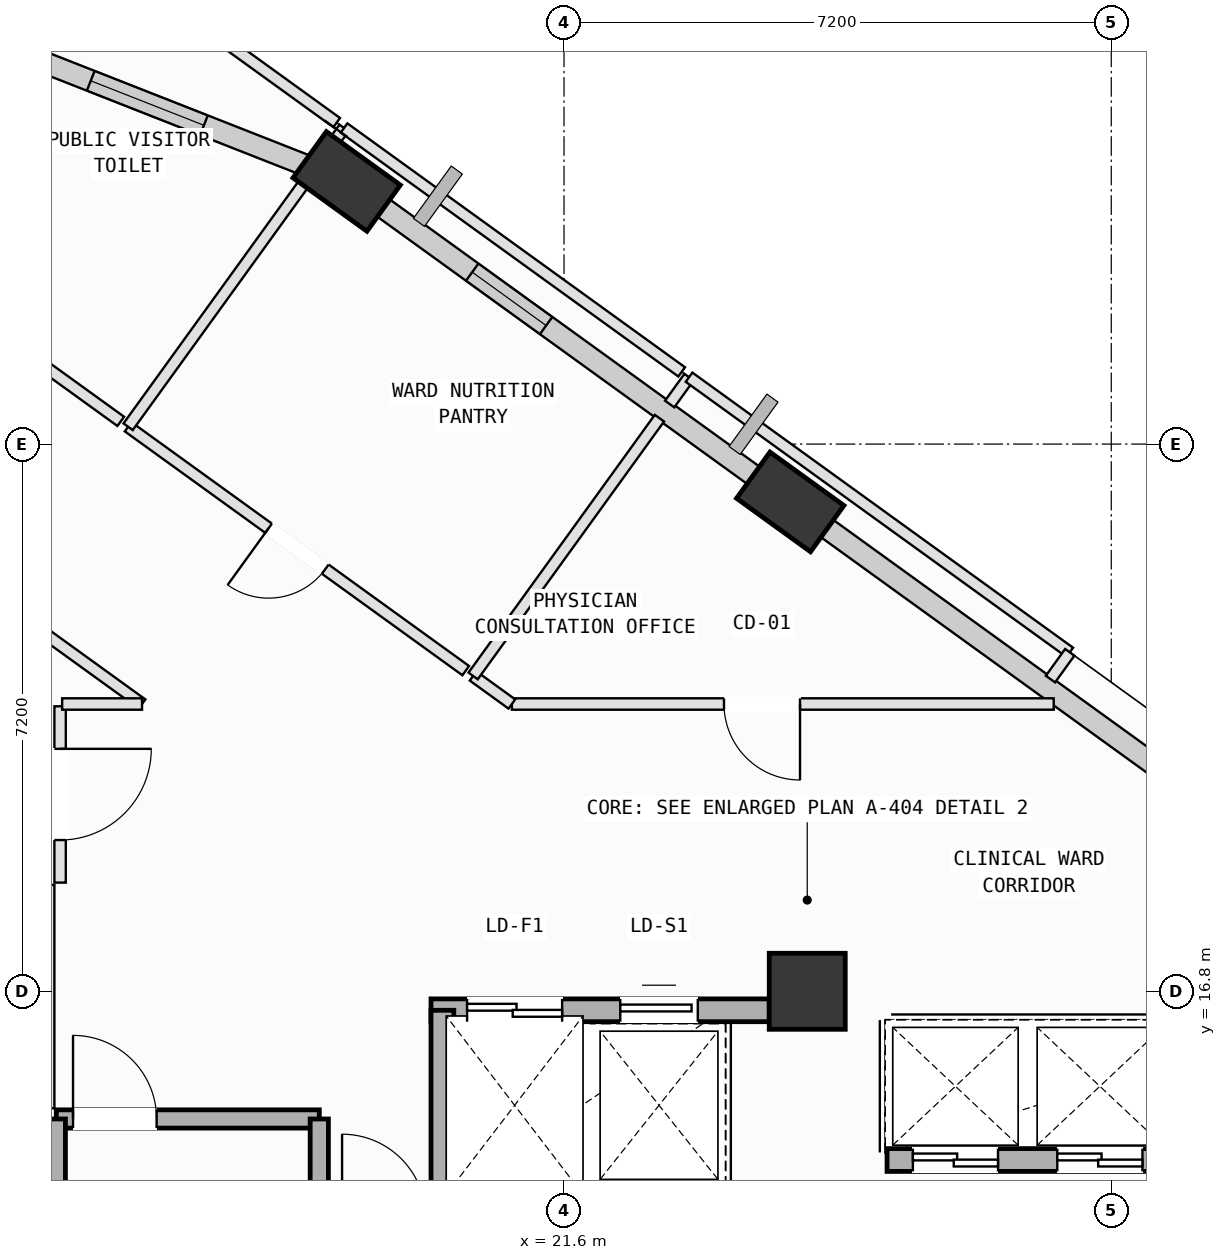
"""IFC4 building model, lengths in metres.
Left out: names, types, materials, properties, quantities, classifications, styles, units other than length and angle.
Written with IfcOpenShell. Run it as: python <this file> out.ifc"""

import sys

from ifc_helpers import new_model, si_unit, direction, frame, frame_2d, origin, origin_2d, place, context, subcontext, project, spatial, rectangle, extrude, element, fill, save


model = new_model("IFC4")
c1 = context("Model", 3, precision=1e-05, world=origin(), true_north=direction((0.0, 1.0)))
c2 = subcontext(c1, "Body", "Model", "MODEL_VIEW")
j1 = project(units=[si_unit("LENGTHUNIT", "METRE"), si_unit("PLANEANGLEUNIT", "RADIAN")], contexts=[c1])
p1 = place(None, origin())
s1 = spatial("IfcSite", under=j1, at=p1, CompositionType="ELEMENT")
p2 = place(p1, origin())
s2 = spatial("IfcBuilding", under=s1, at=p2, CompositionType="ELEMENT")
p3 = place(p2, frame((0.0, 0.0, 255.2)))
s3 = spatial("IfcBuildingStorey", under=s2, at=p3, CompositionType="ELEMENT", Elevation=255.2)
p4 = place(p3, frame((24.8, 16.8, 0.0), z_axis=(0.0, 0.0, 1.0), x_axis=(1.0, 0.0, 0.0)))
e1 = element("IfcColumn", 1, at=p4, inside=s3, PredefinedType="COLUMN", context=c2, shape_type="SweptSolid", body=[
    extrude(rectangle(XDim=1.0, YDim=1.0, at=origin_2d()), origin(), (0.0, 0.0, 1.0), 4.0),
])
p5 = place(p3, frame((24.576, 23.239, 0.002), z_axis=(0.006776235998, -0.037299821574, 0.999281144592), x_axis=(-0.902108356934, 0.430937987842, 0.022202769759)))
e2 = element("IfcColumn", 2, at=p5, inside=s3, PredefinedType="COLUMN", context=c2, shape_type="SweptSolid", body=[
    extrude(rectangle(XDim=1.2, YDim=0.75, at=origin_2d()), origin(), (0.0, 0.0, 1.0), 3.999),
])
p6 = place(p3, frame((18.74, 27.456, 0.002), z_axis=(-0.010426179939, -0.061581530636, 0.998047598993), x_axis=(-0.7016048019, 0.711626761454, 0.036579425007)))
e3 = element("IfcColumn", 3, at=p6, inside=s3, PredefinedType="COLUMN", context=c2, shape_type="SweptSolid", body=[
    extrude(rectangle(XDim=1.2, YDim=0.75, at=origin_2d()), origin(), (0.0, 0.0, 1.0), 4.004),
])
p7 = place(p3, frame((24.94, 22.976, 0.0), z_axis=(0.0, 0.0, 1.0), x_axis=(0.81054690161, -0.585673731945, 0.0)))
e4 = element("IfcWall", 4, at=p7, inside=s3, PredefinedType="SOLIDWALL", context=c2, shape_type="SweptSolid", body=[
    extrude(rectangle(XDim=6.958, YDim=0.28, at=frame_2d((3.479, 0.0))), origin(), (0.0, 0.0, 1.0), 3.165),
])
p8 = place(p3, frame((19.094, 27.2, 0.0), z_axis=(0.0, 0.0, 1.0), x_axis=(0.810562962933, -0.585651503132, 0.0)))
e5 = element("IfcWall", 5, at=p8, inside=s3, PredefinedType="SOLIDWALL", context=c2, shape_type="SweptSolid", body=[
    extrude(rectangle(XDim=6.424, YDim=0.28, at=frame_2d((3.212, 0.0))), origin(), (0.0, 0.0, 1.0), 3.265),
])
p9 = place(p8, frame((1.601, 0.0, 0.75)))
e6 = element("IfcOpeningElement", 6, at=p9, cuts=e5, PredefinedType="OPENING", context=c2, shape_type="SweptSolid", body=[
    extrude(rectangle(XDim=1.2, YDim=1.75, at=frame_2d((0.6, 0.875))), frame((0.0, 0.15, 0.0), z_axis=(0.0, -1.0, 0.0), x_axis=(1.0, 0.0, 0.0)), (0.0, 0.0, 1.0), 0.3),
])
p10 = place(p3, frame((13.478, 29.526, 0.0), z_axis=(0.0, 0.0, 1.0), x_axis=(0.930610950032, -0.366009917461, 0.0)))
e7 = element("IfcWall", 7, at=p10, inside=s3, PredefinedType="SOLIDWALL", context=c2, shape_type="SweptSolid", body=[
    extrude(rectangle(XDim=5.302, YDim=0.28, at=frame_2d((2.651, 0.0))), origin(), (0.0, 0.0, 1.0), 3.265),
])
p11 = place(p10, frame((2.037, 0.0, 0.75)))
e8 = element("IfcOpeningElement", 8, at=p11, cuts=e7, PredefinedType="OPENING", context=c2, shape_type="SweptSolid", body=[
    extrude(rectangle(XDim=1.6, YDim=1.95, at=frame_2d((0.8, 0.975))), frame((0.0, 0.15, 0.0), z_axis=(0.0, -1.0, 0.0), x_axis=(1.0, 0.0, 0.0)), (0.0, 0.0, 1.0), 0.3),
])
p12 = place(p3, frame((14.92, 15.12, 0.0), z_axis=(0.0, 0.0, 1.0), x_axis=(1.0, 0.0, 0.0)))
e9 = element("IfcWall", 9, at=p12, inside=s3, PredefinedType="SOLIDWALL", context=c2, shape_type="SweptSolid", body=[
    extrude(rectangle(XDim=3.46, YDim=0.24, at=frame_2d((1.73, 0.0))), origin(), (0.0, 0.0, 1.0), 3.78),
])
p13 = place(p12, frame((0.22, 0.0, 0.0)))
e10 = element("IfcOpeningElement", 10, at=p13, cuts=e9, PredefinedType="OPENING", context=c2, shape_type="SweptSolid", body=[
    extrude(rectangle(XDim=1.1, YDim=2.15, at=frame_2d((0.55, 1.075))), frame((0.0, 0.13, 0.0), z_axis=(0.0, -1.0, 0.0), x_axis=(1.0, 0.0, 0.0)), (0.0, 0.0, 1.0), 0.26),
])
for number, where, z_axis, x_axis in (
    (11, (18.38, 15.12, 0.0), (0.0, 0.0, 1.0), (0.0, -1.0, 0.0)),
    (12, (14.92, 8.075, 0.0), (0.0, 0.0, 1.0), (0.0, 1.0, 0.0)),
):
    element("IfcWall", number, at=place(p3, frame(where, z_axis=z_axis, x_axis=x_axis)), inside=s3, PredefinedType="SOLIDWALL", context=c2, shape_type="SweptSolid", body=[
        extrude(rectangle(XDim=7.045, YDim=0.24, at=frame_2d((3.522, 0.0))), origin(), (0.0, 0.0, 1.0), 3.78),
    ])
p14 = place(p3, frame((19.85, 16.55, 0.0), z_axis=(0.0, 0.0, 1.0), x_axis=(1.0, 0.0, 0.0)))
e13 = element("IfcWall", 13, at=p14, inside=s3, PredefinedType="SOLIDWALL", context=c2, shape_type="SweptSolid", body=[
    extrude(rectangle(XDim=4.45, YDim=0.3, at=frame_2d((2.225, 0.0))), origin(), (0.0, 0.0, 1.0), 3.78),
])
p15 = place(p14, frame((0.475, 0.0, 0.0)))
e14 = element("IfcOpeningElement", 14, at=p15, cuts=e13, PredefinedType="OPENING", context=c2, shape_type="SweptSolid", body=[
    extrude(rectangle(XDim=1.25, YDim=2.18, at=frame_2d((0.625, 1.09))), frame((0.0, 0.16, 0.0), z_axis=(0.0, -1.0, 0.0), x_axis=(1.0, 0.0, 0.0)), (0.0, 0.0, 1.0), 0.32),
])
p16 = place(p14, frame((2.49, 0.0, 0.0)))
e15 = element("IfcOpeningElement", 15, at=p16, cuts=e13, PredefinedType="OPENING", context=c2, shape_type="SweptSolid", body=[
    extrude(rectangle(XDim=1.02, YDim=2.12, at=frame_2d((0.51, 1.06))), frame((0.0, 0.16, 0.0), z_axis=(0.0, -1.0, 0.0), x_axis=(1.0, 0.0, 0.0)), (0.0, 0.0, 1.0), 0.32),
])
p17 = place(p3, frame((20.0, 13.82, 0.0), z_axis=(0.0, 0.0, 1.0), x_axis=(0.0, 1.0, 0.0)))
e16 = element("IfcWall", 16, at=p17, inside=s3, PredefinedType="SOLIDWALL", context=c2, shape_type="SweptSolid", body=[
    extrude(rectangle(XDim=2.73, YDim=0.3, at=frame_2d((1.365, 0.0))), origin(), (0.0, 0.0, 1.0), 3.78),
])
p18 = place(p3, frame((25.85, 14.58, 0.0), z_axis=(0.0, 0.0, 1.0), x_axis=(1.0, 0.0, 0.0)))
e17 = element("IfcWall", 17, at=p18, inside=s3, PredefinedType="SOLIDWALL", context=c2, shape_type="SweptSolid", body=[
    extrude(rectangle(XDim=5.45, YDim=0.3, at=frame_2d((2.725, 0.0))), origin(), (0.0, 0.0, 1.0), 3.78),
])
p19 = place(p18, frame((0.34, 0.0, 0.0)))
e18 = element("IfcOpeningElement", 18, at=p19, cuts=e17, PredefinedType="OPENING", context=c2, shape_type="SweptSolid", body=[
    extrude(rectangle(XDim=1.12, YDim=2.15, at=frame_2d((0.56, 1.075))), frame((0.0, 0.16, 0.0), z_axis=(0.0, -1.0, 0.0), x_axis=(1.0, 0.0, 0.0)), (0.0, 0.0, 1.0), 0.32),
])
p20 = place(p18, frame((2.24, 0.0, 0.0)))
e19 = element("IfcOpeningElement", 19, at=p20, cuts=e17, PredefinedType="OPENING", context=c2, shape_type="SweptSolid", body=[
    extrude(rectangle(XDim=1.12, YDim=2.15, at=frame_2d((0.56, 1.075))), frame((0.0, 0.16, 0.0), z_axis=(0.0, -1.0, 0.0), x_axis=(1.0, 0.0, 0.0)), (0.0, 0.0, 1.0), 0.32),
])
p21 = place(p3, frame((14.97, 20.55, 0.0), z_axis=(0.0, 0.0, 1.0), x_axis=(0.0, -1.0, 0.0)))
e20 = element("IfcWall", 20, at=p21, inside=s3, PredefinedType="PARTITIONING", context=c2, shape_type="SweptSolid", body=[
    extrude(rectangle(XDim=2.32, YDim=0.15, at=frame_2d((1.16, 0.0))), origin(), (0.0, 0.0, 1.0), 3.78),
])
p22 = place(p21, frame((0.56, 0.0, 0.0)))
e21 = element("IfcOpeningElement", 21, at=p22, cuts=e20, PredefinedType="OPENING", context=c2, shape_type="SweptSolid", body=[
    extrude(rectangle(XDim=1.2, YDim=2.15, at=frame_2d((0.6, 1.075))), frame((0.0, 0.085, 0.0), z_axis=(0.0, -1.0, 0.0), x_axis=(1.0, 0.0, 0.0)), (0.0, 0.0, 1.0), 0.17),
])
p23 = place(p3, frame((14.82, 18.2, 0.0), z_axis=(0.0, 0.0, 1.0), x_axis=(0.0, -1.0, 0.0)))
e22 = element("IfcWall", 22, at=p23, inside=s3, PredefinedType="PARTITIONING", context=c2, shape_type="SweptSolid", body=[
    extrude(rectangle(XDim=2.94, YDim=0.15, at=frame_2d((1.47, 0.0))), origin(), (0.0, 0.0, 1.0), 3.78),
])
p24 = place(p3, frame((14.31, 21.836, 0.0), z_axis=(0.0, 0.0, 1.0), x_axis=(0.810544103315, -0.585677604643, 0.0)))
e23 = element("IfcWall", 23, at=p24, inside=s3, PredefinedType="PARTITIONING", context=c2, shape_type="SweptSolid", body=[
    extrude(rectangle(XDim=2.144, YDim=0.15, at=frame_2d((1.072, 0.0))), origin(), (0.0, 0.0, 1.0), 3.78),
])
p25 = place(p3, frame((16.048, 20.58, 0.0), z_axis=(0.0, 0.0, 1.0), x_axis=(-1.0, 0.0, 0.0)))
e24 = element("IfcWall", 24, at=p25, inside=s3, PredefinedType="PARTITIONING", context=c2, shape_type="SweptSolid", body=[
    extrude(rectangle(XDim=1.051, YDim=0.15, at=frame_2d((0.525, 0.0))), origin(), (0.0, 0.0, 1.0), 3.78),
])
p26 = place(p3, frame((28.043, 20.58, 0.0), z_axis=(0.0, 0.0, 1.0), x_axis=(-1.0, 0.0, 0.0)))
e25 = element("IfcWall", 25, at=p26, inside=s3, PredefinedType="PARTITIONING", context=c2, shape_type="SweptSolid", body=[
    extrude(rectangle(XDim=7.129, YDim=0.15, at=frame_2d((3.564, 0.0))), origin(), (0.0, 0.0, 1.0), 3.415),
])
p27 = place(p26, frame((3.338, 0.0, 0.0)))
e26 = element("IfcOpeningElement", 26, at=p27, cuts=e25, PredefinedType="OPENING", context=c2, shape_type="SweptSolid", body=[
    extrude(rectangle(XDim=1.0, YDim=2.12, at=frame_2d((0.5, 1.06))), frame((0.0, 0.085, 0.0), z_axis=(0.0, -1.0, 0.0), x_axis=(1.0, 0.0, 0.0)), (0.0, 0.0, 1.0), 0.17),
])
p28 = place(p3, frame((20.914, 20.58, 0.0), z_axis=(0.0, 0.0, 1.0), x_axis=(-0.810259680678, 0.586071028006, 0.0)))
e27 = element("IfcWall", 27, at=p28, inside=s3, PredefinedType="PARTITIONING", context=c2, shape_type="SweptSolid", body=[
    extrude(rectangle(XDim=0.629, YDim=0.15, at=frame_2d((0.315, 0.0))), origin(), (0.0, 0.0, 1.0), 3.415),
])
p29 = place(p3, frame((20.404, 20.949, 0.0), z_axis=(0.0, 0.0, 1.0), x_axis=(0.585660941612, 0.810556143317, 0.0)))
e28 = element("IfcWall", 28, at=p29, inside=s3, PredefinedType="PARTITIONING", context=c2, shape_type="SweptSolid", body=[
    extrude(rectangle(XDim=4.185, YDim=0.15, at=frame_2d((2.092, 0.0))), origin(), (0.0, 0.0, 1.0), 3.78),
])
p30 = place(p3, frame((22.99, 24.527, 0.0), z_axis=(0.0, 0.0, 1.0), x_axis=(0.586002294108, 0.810309392331, 0.0)))
e29 = element("IfcWall", 29, at=p30, inside=s3, PredefinedType="PARTITIONING", context=c2, shape_type="SweptSolid", body=[
    extrude(rectangle(XDim=0.435, YDim=0.15, at=frame_2d((0.218, 0.0))), origin(), (0.0, 0.0, 1.0), 3.78),
])
p31 = place(p3, frame((23.245, 24.88, 0.0), z_axis=(0.0, 0.0, 1.0), x_axis=(0.810493760552, -0.585747269824, 0.0)))
e30 = element("IfcWall", 30, at=p31, inside=s3, PredefinedType="PARTITIONING", context=c2, shape_type="SweptSolid", body=[
    extrude(rectangle(XDim=6.18, YDim=0.15, at=frame_2d((3.09, 0.0))), origin(), (0.0, 0.0, 1.0), 3.78),
])
p32 = place(p3, frame((28.254, 21.26, 0.0), z_axis=(0.0, 0.0, 1.0), x_axis=(-0.584956490909, -0.811064672972, 0.0)))
e31 = element("IfcWall", 31, at=p32, inside=s3, PredefinedType="PARTITIONING", context=c2, shape_type="SweptSolid", body=[
    extrude(rectangle(XDim=0.434, YDim=0.15, at=frame_2d((0.217, 0.0))), origin(), (0.0, 0.0, 1.0), 3.78),
])
p33 = place(p3, frame((20.307, 21.019, 0.0), z_axis=(0.0, 0.0, 1.0), x_axis=(-0.810596982644, 0.585604415735, 0.0)))
e32 = element("IfcWall", 32, at=p33, inside=s3, PredefinedType="PARTITIONING", context=c2, shape_type="SweptSolid", body=[
    extrude(rectangle(XDim=5.48, YDim=0.15, at=frame_2d((2.74, 0.0))), origin(), (0.0, 0.0, 1.0), 3.415),
])
p34 = place(p33, frame((2.28, 0.0, 0.0)))
e33 = element("IfcOpeningElement", 33, at=p34, cuts=e32, PredefinedType="OPENING", context=c2, shape_type="SweptSolid", body=[
    extrude(rectangle(XDim=0.92, YDim=2.1, at=frame_2d((0.46, 1.05))), frame((0.0, 0.085, 0.0), z_axis=(0.0, -1.0, 0.0), x_axis=(1.0, 0.0, 0.0)), (0.0, 0.0, 1.0), 0.17),
])
p35 = place(p3, frame((15.865, 24.228, 0.0), z_axis=(0.0, 0.0, 1.0), x_axis=(0.585696470698, 0.810530470872, 0.0)))
e34 = element("IfcWall", 34, at=p35, inside=s3, PredefinedType="PARTITIONING", context=c2, shape_type="SweptSolid", body=[
    extrude(rectangle(XDim=4.069, YDim=0.15, at=frame_2d((2.034, 0.0))), origin(), (0.0, 0.0, 1.0), 3.78),
])
p36 = place(p3, frame((18.387, 27.718, 0.0), z_axis=(0.0, 0.0, 1.0), x_axis=(0.586276407264, 0.81011108762, 0.0)))
e35 = element("IfcWall", 35, at=p36, inside=s3, PredefinedType="PARTITIONING", context=c2, shape_type="SweptSolid", body=[
    extrude(rectangle(XDim=0.544, YDim=0.15, at=frame_2d((0.272, 0.0))), origin(), (0.0, 0.0, 1.0), 3.78),
])
p37 = place(p3, frame((18.706, 28.159, 0.0), z_axis=(0.0, 0.0, 1.0), x_axis=(0.810596982644, -0.585604415735, 0.0)))
e36 = element("IfcWall", 36, at=p37, inside=s3, PredefinedType="PARTITIONING", context=c2, shape_type="SweptSolid", body=[
    extrude(rectangle(XDim=5.48, YDim=0.15, at=frame_2d((2.74, 0.0))), origin(), (0.0, 0.0, 1.0), 3.78),
])
p38 = place(p3, frame((15.091, 30.771, 0.0), z_axis=(0.0, 0.0, 1.0), x_axis=(0.810639171761, -0.585546012887, 0.0)))
e37 = element("IfcWall", 37, at=p38, inside=s3, PredefinedType="PARTITIONING", context=c2, shape_type="SweptSolid", body=[
    extrude(rectangle(XDim=4.34, YDim=0.15, at=frame_2d((2.17, 0.0))), origin(), (0.0, 0.0, 1.0), 3.78),
])
p39 = place(p3, frame((15.768, 24.299, 0.0), z_axis=(0.0, 0.0, 1.0), x_axis=(-0.810655591008, 0.58552328115, 0.0)))
e38 = element("IfcWall", 38, at=p39, inside=s3, PredefinedType="PARTITIONING", context=c2, shape_type="SweptSolid", body=[
    extrude(rectangle(XDim=5.175, YDim=0.15, at=frame_2d((2.587, 0.0))), origin(), (0.0, 0.0, 1.0), 3.78),
])
p40 = place(p39, frame((2.127, 0.0, 0.0)))
e39 = element("IfcOpeningElement", 39, at=p40, cuts=e38, PredefinedType="OPENING", context=c2, shape_type="SweptSolid", body=[
    extrude(rectangle(XDim=0.92, YDim=2.1, at=frame_2d((0.46, 1.05))), frame((0.0, 0.085, 0.0), z_axis=(0.0, -1.0, 0.0), x_axis=(1.0, 0.0, 0.0)), (0.0, 0.0, 1.0), 0.17),
])
p41 = place(p9, origin())
e40 = element("IfcWindow", 40, at=p41, inside=s3, PartitioningType="SINGLE_PANEL", PredefinedType="WINDOW", context=c2, shape_type="SweptSolid", body=[
    extrude(rectangle(XDim=1.2, YDim=1.75, at=frame_2d((0.6, 0.875))), frame((0.0, 0.03, 0.0), z_axis=(0.0, -1.0, 0.0), x_axis=(1.0, 0.0, 0.0)), (0.0, 0.0, 1.0), 0.06),
])
fill(e6, e40)
p42 = place(p11, origin())
e41 = element("IfcWindow", 41, at=p42, inside=s3, PartitioningType="SINGLE_PANEL", PredefinedType="WINDOW", context=c2, shape_type="SweptSolid", body=[
    extrude(rectangle(XDim=1.6, YDim=1.95, at=frame_2d((0.8, 0.975))), frame((0.0, 0.03, 0.0), z_axis=(0.0, -1.0, 0.0), x_axis=(1.0, 0.0, 0.0)), (0.0, 0.0, 1.0), 0.06),
])
fill(e8, e41)
p43 = place(p13, origin())
e42 = element("IfcDoor", 42, at=p43, inside=s3, OperationType="SINGLE_SWING_LEFT", PredefinedType="DOOR", context=c2, shape_type="SweptSolid", body=[
    extrude(rectangle(XDim=1.1, YDim=2.15, at=frame_2d((0.55, 1.075))), frame((0.0, 0.025, 0.0), z_axis=(0.0, -1.0, 0.0), x_axis=(1.0, 0.0, 0.0)), (0.0, 0.0, 1.0), 0.05),
])
fill(e10, e42)
p44 = place(p19, origin())
e43 = element("IfcDoor", 43, at=p44, inside=s3, OperationType="DOUBLE_DOOR_SLIDING", PredefinedType="DOOR", context=c2, shape_type="SweptSolid", body=[
    extrude(rectangle(XDim=1.12, YDim=2.15, at=frame_2d((0.56, 1.075))), frame((0.0, 0.025, 0.0), z_axis=(0.0, -1.0, 0.0), x_axis=(1.0, 0.0, 0.0)), (0.0, 0.0, 1.0), 0.05),
])
fill(e18, e43)
p45 = place(p20, origin())
e44 = element("IfcDoor", 44, at=p45, inside=s3, OperationType="DOUBLE_DOOR_SLIDING", PredefinedType="DOOR", context=c2, shape_type="SweptSolid", body=[
    extrude(rectangle(XDim=1.12, YDim=2.15, at=frame_2d((0.56, 1.075))), frame((0.0, 0.025, 0.0), z_axis=(0.0, -1.0, 0.0), x_axis=(1.0, 0.0, 0.0)), (0.0, 0.0, 1.0), 0.05),
])
fill(e19, e44)
p46 = place(p15, origin())
e45 = element("IfcDoor", 45, at=p46, inside=s3, OperationType="DOUBLE_DOOR_SLIDING", PredefinedType="DOOR", context=c2, shape_type="SweptSolid", body=[
    extrude(rectangle(XDim=1.25, YDim=2.18, at=frame_2d((0.625, 1.09))), frame((0.0, 0.025, 0.0), z_axis=(0.0, -1.0, 0.0), x_axis=(1.0, 0.0, 0.0)), (0.0, 0.0, 1.0), 0.05),
])
fill(e14, e45)
p47 = place(p16, origin())
e46 = element("IfcDoor", 46, at=p47, inside=s3, OperationType="SLIDING_TO_LEFT", PredefinedType="DOOR", context=c2, shape_type="SweptSolid", body=[
    extrude(rectangle(XDim=1.02, YDim=2.12, at=frame_2d((0.51, 1.06))), frame((0.0, 0.025, 0.0), z_axis=(0.0, -1.0, 0.0), x_axis=(1.0, 0.0, 0.0)), (0.0, 0.0, 1.0), 0.05),
])
fill(e15, e46)
p48 = place(p22, origin())
e47 = element("IfcDoor", 47, at=p48, inside=s3, OperationType="SINGLE_SWING_LEFT", PredefinedType="DOOR", context=c2, shape_type="SweptSolid", body=[
    extrude(rectangle(XDim=1.2, YDim=2.15, at=frame_2d((0.6, 1.075))), frame((0.0, 0.025, 0.0), z_axis=(0.0, -1.0, 0.0), x_axis=(1.0, 0.0, 0.0)), (0.0, 0.0, 1.0), 0.05),
])
fill(e21, e47)
p49 = place(p27, origin())
e48 = element("IfcDoor", 48, at=p49, inside=s3, OperationType="SINGLE_SWING_LEFT", PredefinedType="DOOR", context=c2, shape_type="SweptSolid", body=[
    extrude(rectangle(XDim=1.0, YDim=2.12, at=frame_2d((0.5, 1.06))), frame((0.0, 0.025, 0.0), z_axis=(0.0, -1.0, 0.0), x_axis=(1.0, 0.0, 0.0)), (0.0, 0.0, 1.0), 0.05),
])
fill(e26, e48)
p50 = place(p34, origin())
e49 = element("IfcDoor", 49, at=p50, inside=s3, OperationType="SINGLE_SWING_RIGHT", PredefinedType="DOOR", context=c2, shape_type="SweptSolid", body=[
    extrude(rectangle(XDim=0.92, YDim=2.1, at=frame_2d((0.46, 1.05))), frame((0.0, 0.025, 0.0), z_axis=(0.0, -1.0, 0.0), x_axis=(1.0, 0.0, 0.0)), (0.0, 0.0, 1.0), 0.05),
])
fill(e33, e49)
save(model, sys.argv[1])
